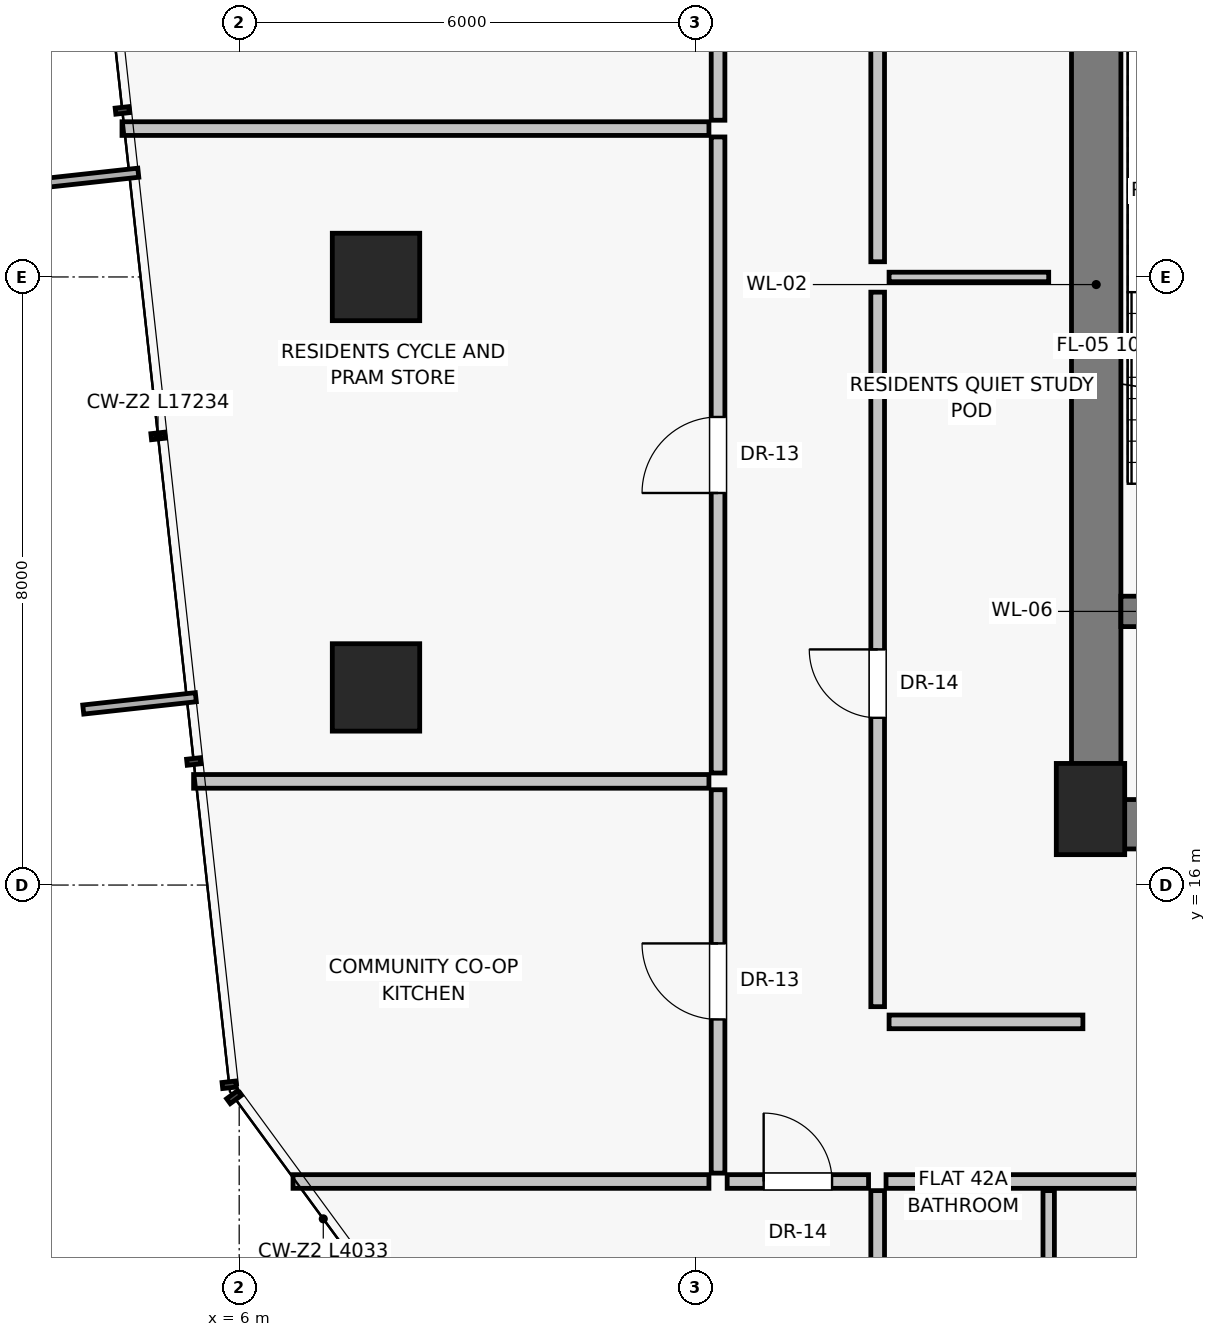
"""IFC4 building model, lengths in metres.
Left out: names, types, materials, properties, quantities, classifications, styles, units other than length and angle.
Written with IfcOpenShell. Run it as: python <this file> out.ifc"""

import sys

from ifc_helpers import new_model, si_unit, direction, frame, frame_2d, origin, origin_2d, place, context, subcontext, project, spatial, rectangle, extrude, source, transform, mapped, element, fill, save


model = new_model("IFC4")
c1 = context("Model", 3, precision=1e-05, world=origin(), true_north=direction((0.0, 1.0)))
c2 = subcontext(c1, "Body", "Model", "MODEL_VIEW")
j1 = project(units=[si_unit("LENGTHUNIT", "METRE"), si_unit("PLANEANGLEUNIT", "RADIAN")], contexts=[c1])
p1 = place(None, origin())
s1 = spatial("IfcSite", under=j1, at=p1, CompositionType="ELEMENT")
p2 = place(p1, origin())
s2 = spatial("IfcBuilding", under=s1, at=p2, CompositionType="ELEMENT")
p3 = place(p2, frame((0.0, 0.0, 149.0)))
s3 = spatial("IfcBuildingStorey", under=s2, at=p3, CompositionType="ELEMENT", Elevation=149.0)
p4 = place(p3, frame((17.2, 17.0, 0.0), z_axis=(0.0, 0.0, 1.0), x_axis=(1.0, 0.0, 0.0)))
e1 = element("IfcColumn", 1, at=p4, inside=s3, PredefinedType="PILASTER", context=c2, shape_type="SweptSolid", body=[
    extrude(rectangle(XDim=0.9, YDim=1.2, at=origin_2d()), origin(), (0.0, 0.0, 1.0), 3.25),
])
for number, where, z_axis, x_axis in (
    (2, (7.8, 24.0, 0.0), (0.0, 0.0, 1.0), (1.0, 0.0, 0.0)),
    (3, (7.8, 18.6, 0.0), (0.0, 0.0, 1.0), (1.0, 0.0, 0.0)),
):
    element("IfcColumn", number, at=place(p3, frame(where, z_axis=z_axis, x_axis=x_axis)), inside=s3, PredefinedType="COLUMN", context=c2, shape_type="SweptSolid", body=[
        extrude(rectangle(XDim=1.15, YDim=1.15, at=origin_2d()), origin(), (0.0, 0.0, 1.0), 3.25),
    ])
p5 = place(p3, frame((17.275, 16.8, 0.0), z_axis=(0.0, 0.0, 1.0), x_axis=(0.0, 1.0, 0.0)))
e4 = element("IfcWall", 4, at=p5, inside=s3, PredefinedType="SHEAR", context=c2, shape_type="SweptSolid", body=[
    extrude(rectangle(XDim=14.2, YDim=0.65, at=frame_2d((7.1, 0.0))), origin(), (0.0, 0.0, 1.0), 3.0),
])
p6 = place(p3, frame((17.2, 16.8, 0.0), z_axis=(0.0, 0.0, 1.0), x_axis=(1.0, 0.0, 0.0)))
e5 = element("IfcWall", 5, at=p6, inside=s3, PredefinedType="SHEAR", context=c2, shape_type="SweptSolid", body=[
    extrude(rectangle(XDim=5.85, YDim=0.65, at=frame_2d((2.925, 0.0))), origin(), (0.0, 0.0, 1.0), 3.0),
])
p7 = place(p6, frame((1.15, 0.0, 0.0)))
e6 = element("IfcOpeningElement", 6, at=p7, cuts=e5, PredefinedType="OPENING", context=c2, shape_type="SweptSolid", body=[
    extrude(rectangle(XDim=1.2, YDim=2.03, at=frame_2d((0.6, 1.015))), frame((0.0, 0.335, 0.0), z_axis=(0.0, -1.0, 0.0), x_axis=(1.0, 0.0, 0.0)), (0.0, 0.0, 1.0), 0.67),
])
p8 = place(p3, frame((17.6, 19.6, 0.0), z_axis=(0.0, 0.0, 1.0), x_axis=(1.0, 0.0, 0.0)))
e7 = element("IfcWall", 7, at=p8, inside=s3, PredefinedType="SHEAR", context=c2, shape_type="SweptSolid", body=[
    extrude(rectangle(XDim=3.4, YDim=0.4, at=frame_2d((1.7, 0.0))), origin(), (0.0, 0.0, 1.0), 3.0),
])
p9 = place(p8, frame((1.05, 0.0, 0.0)))
e8 = element("IfcOpeningElement", 8, at=p9, cuts=e7, PredefinedType="OPENING", context=c2, shape_type="SweptSolid", body=[
    extrude(rectangle(XDim=1.1, YDim=2.03, at=frame_2d((0.55, 1.015))), frame((0.0, 0.21, 0.0), z_axis=(0.0, -1.0, 0.0), x_axis=(1.0, 0.0, 0.0)), (0.0, 0.0, 1.0), 0.42),
])
p10 = place(p3, frame((14.4, 14.4, 0.0), z_axis=(0.0, 0.0, 1.0), x_axis=(0.0, 1.0, 0.0)))
e9 = element("IfcWall", 9, at=p10, inside=s3, PredefinedType="PARTITIONING", context=c2, shape_type="SweptSolid", body=[
    extrude(rectangle(XDim=9.4, YDim=0.18, at=frame_2d((4.7, 0.0))), origin(), (0.0, 0.0, 1.0), 3.0),
])
p11 = place(p10, frame((3.8, 0.0, 0.0)))
e10 = element("IfcOpeningElement", 10, at=p11, cuts=e9, PredefinedType="OPENING", context=c2, shape_type="SweptSolid", body=[
    extrude(rectangle(XDim=0.9, YDim=2.01, at=frame_2d((0.45, 1.005))), frame((0.0, 0.1, 0.0), z_axis=(0.0, -1.0, 0.0), x_axis=(1.0, 0.0, 0.0)), (0.0, 0.0, 1.0), 0.2),
])
p12 = place(p3, frame((14.4, 24.2, 0.0), z_axis=(0.0, 0.0, 1.0), x_axis=(0.0, 1.0, 0.0)))
e11 = element("IfcWall", 11, at=p12, inside=s3, PredefinedType="PARTITIONING", context=c2, shape_type="SweptSolid", body=[
    extrude(rectangle(XDim=9.2, YDim=0.18, at=frame_2d((4.6, 0.0))), origin(), (0.0, 0.0, 1.0), 3.0),
])
p13 = place(p12, frame((3.8, 0.0, 0.0)))
e12 = element("IfcOpeningElement", 12, at=p13, cuts=e11, PredefinedType="OPENING", context=c2, shape_type="SweptSolid", body=[
    extrude(rectangle(XDim=0.9, YDim=2.01, at=frame_2d((0.45, 1.005))), frame((0.0, 0.1, 0.0), z_axis=(0.0, -1.0, 0.0), x_axis=(1.0, 0.0, 0.0)), (0.0, 0.0, 1.0), 0.2),
])
p14 = place(p3, frame((14.55, 24.0, 0.0), z_axis=(0.0, 0.0, 1.0), x_axis=(1.0, 0.0, 0.0)))
e13 = element("IfcWall", 13, at=p14, inside=s3, PredefinedType="PARTITIONING", context=c2, shape_type="SweptSolid", body=[
    extrude(rectangle(XDim=2.1, YDim=0.125, at=frame_2d((1.05, 0.0))), origin(), (0.0, 0.0, 1.0), 3.0),
])
p15 = place(p3, frame((14.55, 14.2, 0.0), z_axis=(0.0, 0.0, 1.0), x_axis=(1.0, 0.0, 0.0)))
e14 = element("IfcWall", 14, at=p15, inside=s3, PredefinedType="PARTITIONING", context=c2, shape_type="SweptSolid", body=[
    extrude(rectangle(XDim=2.55, YDim=0.18, at=frame_2d((1.275, 0.0))), origin(), (0.0, 0.0, 1.0), 3.0),
])
p16 = place(p3, frame((14.4, 11.98, 0.0), z_axis=(0.0, 0.0, 1.0), x_axis=(0.0, -1.0, 0.0)))
e15 = element("IfcWall", 15, at=p16, inside=s3, PredefinedType="PARTITIONING", context=c2, shape_type="SweptSolid", body=[
    extrude(rectangle(XDim=4.746, YDim=0.18, at=frame_2d((2.373, 0.0))), origin(), (0.0, 0.0, 1.0), 3.0),
])
p17 = place(p3, frame((14.51, 12.1, 0.0), z_axis=(0.0, 0.0, 1.0), x_axis=(1.0, 0.0, 0.0)))
e16 = element("IfcWall", 16, at=p17, inside=s3, PredefinedType="PARTITIONING", context=c2, shape_type="SweptSolid", body=[
    extrude(rectangle(XDim=11.124, YDim=0.18, at=frame_2d((5.562, 0.0))), origin(), (0.0, 0.0, 1.0), 2.58),
])
p18 = place(p17, frame((3.717, 0.0, 0.0)))
e17 = element("IfcOpeningElement", 17, at=p18, cuts=e16, PredefinedType="OPENING", context=c2, shape_type="SweptSolid", body=[
    extrude(rectangle(XDim=0.95, YDim=2.02, at=frame_2d((0.475, 1.01))), frame((0.0, 0.1, 0.0), z_axis=(0.0, -1.0, 0.0), x_axis=(1.0, 0.0, 0.0)), (0.0, 0.0, 1.0), 0.2),
])
p19 = place(p3, frame((16.65, 11.98, 0.0), z_axis=(0.0, 0.0, 1.0), x_axis=(0.0, -1.0, 0.0)))
e18 = element("IfcWall", 18, at=p19, inside=s3, PredefinedType="PARTITIONING", context=c2, shape_type="SweptSolid", body=[
    extrude(rectangle(XDim=1.8, YDim=0.15, at=frame_2d((0.9, 0.0))), origin(), (0.0, 0.0, 1.0), 3.0),
])
p20 = place(p3, frame((12.18, 12.1, 0.0), z_axis=(0.0, 0.0, 1.0), x_axis=(-1.0, 0.0, 0.0)))
e19 = element("IfcWall", 19, at=p20, inside=s3, PredefinedType="PARTITIONING", context=c2, shape_type="SweptSolid", body=[
    extrude(rectangle(XDim=5.471, YDim=0.18, at=frame_2d((2.736, 0.0))), origin(), (0.0, 0.0, 1.0), 3.0),
])
p21 = place(p3, frame((12.3, 12.21, 0.0), z_axis=(0.0, 0.0, 1.0), x_axis=(0.0, 1.0, 0.0)))
e20 = element("IfcWall", 20, at=p21, inside=s3, PredefinedType="PARTITIONING", context=c2, shape_type="SweptSolid", body=[
    extrude(rectangle(XDim=5.044, YDim=0.18, at=frame_2d((2.522, 0.0))), origin(), (0.0, 0.0, 1.0), 3.0),
])
p22 = place(p21, frame((2.022, 0.0, 0.0)))
e21 = element("IfcOpeningElement", 21, at=p22, cuts=e20, PredefinedType="OPENING", context=c2, shape_type="SweptSolid", body=[
    extrude(rectangle(XDim=1.0, YDim=2.01, at=frame_2d((0.5, 1.005))), frame((0.0, 0.1, 0.0), z_axis=(0.0, -1.0, 0.0), x_axis=(1.0, 0.0, 0.0)), (0.0, 0.0, 1.0), 0.2),
])
p23 = place(p3, frame((12.3, 17.474, 0.0), z_axis=(0.0, 0.0, 1.0), x_axis=(0.0, 1.0, 0.0)))
e22 = element("IfcWall", 22, at=p23, inside=s3, PredefinedType="PARTITIONING", context=c2, shape_type="SweptSolid", body=[
    extrude(rectangle(XDim=8.368, YDim=0.18, at=frame_2d((4.184, 0.0))), origin(), (0.0, 0.0, 1.0), 2.58),
])
p24 = place(p23, frame((3.684, 0.0, 0.0)))
e23 = element("IfcOpeningElement", 23, at=p24, cuts=e22, PredefinedType="OPENING", context=c2, shape_type="SweptSolid", body=[
    extrude(rectangle(XDim=1.0, YDim=2.01, at=frame_2d((0.5, 1.005))), frame((0.0, 0.1, 0.0), z_axis=(0.0, -1.0, 0.0), x_axis=(1.0, 0.0, 0.0)), (0.0, 0.0, 1.0), 0.2),
])
p25 = place(p3, frame((12.18, 17.364, 0.0), z_axis=(0.0, 0.0, 1.0), x_axis=(-1.0, 0.0, 0.0)))
e24 = element("IfcWall", 24, at=p25, inside=s3, PredefinedType="PARTITIONING", context=c2, shape_type="SweptSolid", body=[
    extrude(rectangle(XDim=6.78, YDim=0.18, at=frame_2d((3.39, 0.0))), origin(), (0.0, 0.0, 1.0), 2.378),
])
p26 = place(p3, frame((12.18, 25.952, 0.0), z_axis=(0.0, 0.0, 1.0), x_axis=(-1.0, 0.0, 0.0)))
e25 = element("IfcWall", 25, at=p26, inside=s3, PredefinedType="PARTITIONING", context=c2, shape_type="SweptSolid", body=[
    extrude(rectangle(XDim=7.722, YDim=0.18, at=frame_2d((3.861, 0.0))), origin(), (0.0, 0.0, 1.0), 3.0),
])
p27 = place(p3, frame((12.3, 26.062, 0.0), z_axis=(0.0, 0.0, 1.0), x_axis=(0.0, 1.0, 0.0)))
e26 = element("IfcWall", 26, at=p27, inside=s3, PredefinedType="PARTITIONING", context=c2, shape_type="SweptSolid", body=[
    extrude(rectangle(XDim=3.484, YDim=0.18, at=frame_2d((1.742, 0.0))), origin(), (0.0, 0.0, 1.0), 2.58),
])
p28 = place(p27, frame((1.242, 0.0, 0.0)))
e27 = element("IfcOpeningElement", 27, at=p28, cuts=e26, PredefinedType="OPENING", context=c2, shape_type="SweptSolid", body=[
    extrude(rectangle(XDim=1.0, YDim=2.01, at=frame_2d((0.5, 1.005))), frame((0.0, 0.1, 0.0), z_axis=(0.0, -1.0, 0.0), x_axis=(1.0, 0.0, 0.0)), (0.0, 0.0, 1.0), 0.2),
])
p29 = place(p3, frame((12.42, 12.1, 0.0), z_axis=(0.0, 0.0, 1.0), x_axis=(1.0, 0.0, 0.0)))
e28 = element("IfcWall", 28, at=p29, inside=s3, PredefinedType="PARTITIONING", context=c2, shape_type="SweptSolid", body=[
    extrude(rectangle(XDim=1.86, YDim=0.18, at=frame_2d((0.93, 0.0))), origin(), (0.0, 0.0, 1.0), 3.0),
])
p30 = place(p29, frame((0.48, 0.0, 0.0)))
e29 = element("IfcOpeningElement", 29, at=p30, cuts=e28, PredefinedType="OPENING", context=c2, shape_type="SweptSolid", body=[
    extrude(rectangle(XDim=0.9, YDim=2.01, at=frame_2d((0.45, 1.005))), frame((0.0, 0.1, 0.0), z_axis=(0.0, -1.0, 0.0), x_axis=(1.0, 0.0, 0.0)), (0.0, 0.0, 1.0), 0.2),
])
m1 = source(origin(), c2, "Body", "SweptSolid", [
    extrude(rectangle(XDim=0.9, YDim=2.01, at=frame_2d((0.45, 1.005))), frame((0.0, 0.025, 0.0), z_axis=(0.0, -1.0, 0.0), x_axis=(1.0, 0.0, 0.0)), (0.0, 0.0, 1.0), 0.05),
])
p31 = place(p11, origin())
e30 = element("IfcDoor", 30, at=p31, inside=s3, OperationType="SINGLE_SWING_RIGHT", PredefinedType="DOOR", context=c2, shape_type="MappedRepresentation", body=[
    mapped(m1, transform((0.0, 0.0, 0.0), scale=1.0)),
])
fill(e10, e30)
m2 = source(origin(), c2, "Body", "SweptSolid", [
    extrude(rectangle(XDim=1.0, YDim=2.01, at=frame_2d((0.5, 1.005))), frame((0.0, 0.025, 0.0), z_axis=(0.0, -1.0, 0.0), x_axis=(1.0, 0.0, 0.0)), (0.0, 0.0, 1.0), 0.05),
])
p32 = place(p22, origin())
e31 = element("IfcDoor", 31, at=p32, inside=s3, OperationType="SINGLE_SWING_RIGHT", PredefinedType="DOOR", context=c2, shape_type="MappedRepresentation", body=[
    mapped(m2, transform((0.0, 0.0, 0.0), scale=1.0)),
])
fill(e21, e31)
p33 = place(p24, origin())
e32 = element("IfcDoor", 32, at=p33, inside=s3, OperationType="SINGLE_SWING_LEFT", PredefinedType="DOOR", context=c2, shape_type="MappedRepresentation", body=[
    mapped(m2, transform((0.0, 0.0, 0.0), scale=1.0)),
])
fill(e23, e32)
p34 = place(p30, origin())
e33 = element("IfcDoor", 33, at=p34, inside=s3, OperationType="SINGLE_SWING_LEFT", PredefinedType="DOOR", context=c2, shape_type="MappedRepresentation", body=[
    mapped(m1, transform((0.0, 0.0, 0.0), scale=1.0)),
])
fill(e29, e33)
save(model, sys.argv[1])
